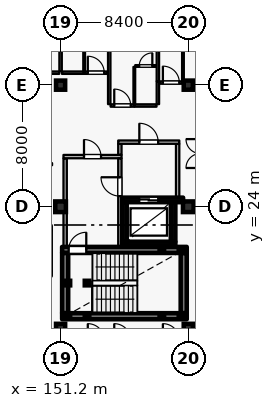
"""IFC4 building model, lengths in metres.
Left out: names, types, materials, properties, quantities, classifications, styles, units other than length and angle.
Written with IfcOpenShell. Run it as: python <this file> out.ifc"""

import sys

from ifc_helpers import new_model, si_unit, direction, frame, frame_2d, origin, origin_2d, place, context, subcontext, project, spatial, rectangle, hollow_rectangle, extrude, element, fill, save


model = new_model("IFC4")
c1 = context("Model", 3, precision=1e-05, world=origin(), true_north=direction((0.0, 1.0)))
c2 = subcontext(c1, "Body", "Model", "MODEL_VIEW")
j1 = project(units=[si_unit("LENGTHUNIT", "METRE"), si_unit("PLANEANGLEUNIT", "RADIAN")], contexts=[c1])
p1 = place(None, origin())
s1 = spatial("IfcSite", under=j1, at=p1, CompositionType="ELEMENT")
p2 = place(p1, origin())
s2 = spatial("IfcBuilding", under=s1, at=p2, CompositionType="ELEMENT")
p3 = place(p2, frame((0.0, 0.0, 36.0)))
s3 = spatial("IfcBuildingStorey", under=s2, at=p3, CompositionType="ELEMENT", Elevation=36.0)
for number, where, z_axis, x_axis in (
    (1, (151.2, 24.0, 0.0), (0.0, 0.0, 1.0), (1.0, 0.0, 0.0)),
    (2, (159.6, 24.0, 0.0), (0.0, 0.0, 1.0), (1.0, 0.0, 0.0)),
):
    element("IfcColumn", number, at=place(p3, frame(where, z_axis=z_axis, x_axis=x_axis)), inside=s3, PredefinedType="COLUMN", context=c2, shape_type="SweptSolid", body=[
        extrude(rectangle(XDim=0.7, YDim=0.7, at=origin_2d()), origin(), (0.0, 0.0, 1.0), 3.6),
    ])
for number, where, z_axis, x_axis in (
    (3, (151.2, 16.0, 0.0), (0.0, 0.0, 1.0), (1.0, 0.0, 0.0)),
    (4, (151.2, 32.0, 0.0), (0.0, 0.0, 1.0), (1.0, 0.0, 0.0)),
    (5, (159.6, 16.0, 0.0), (0.0, 0.0, 1.0), (1.0, 0.0, 0.0)),
    (6, (159.6, 32.0, 0.0), (0.0, 0.0, 1.0), (1.0, 0.0, 0.0)),
):
    element("IfcColumn", number, at=place(p3, frame(where, z_axis=z_axis, x_axis=x_axis)), inside=s3, PredefinedType="COLUMN", context=c2, shape_type="SweptSolid", body=[
        extrude(rectangle(XDim=0.6, YDim=0.6, at=origin_2d()), origin(), (0.0, 0.0, 1.0), 3.6),
    ])
p4 = place(p3, frame((143.15, 32.333, 0.0), z_axis=(0.0, 0.0, 1.0), x_axis=(0.724116091282, 0.689678103427, 0.0)))
e7 = element("IfcWall", 7, at=p4, inside=s3, PredefinedType="SOLIDWALL", context=c2, shape_type="SweptSolid", body=[
    extrude(rectangle(XDim=10.634, YDim=0.24, at=frame_2d((5.317, 0.0))), origin(), (0.0, 0.0, 1.0), 2.94),
])
p5 = place(p4, frame((0.16, 0.0, 0.8)))
e8 = element("IfcOpeningElement", 8, at=p5, cuts=e7, PredefinedType="OPENING", context=c2, shape_type="SweptSolid", body=[
    extrude(rectangle(XDim=1.6, YDim=1.6, at=frame_2d((0.8, 0.8))), frame((0.0, 0.13, 0.0), z_axis=(0.0, -1.0, 0.0), x_axis=(1.0, 0.0, 0.0)), (0.0, 0.0, 1.0), 0.26),
])
p6 = place(p4, frame((3.523, 0.0, 0.8)))
e9 = element("IfcOpeningElement", 9, at=p6, cuts=e7, PredefinedType="OPENING", context=c2, shape_type="SweptSolid", body=[
    extrude(rectangle(XDim=1.6, YDim=1.6, at=frame_2d((0.8, 0.8))), frame((0.0, 0.13, 0.0), z_axis=(0.0, -1.0, 0.0), x_axis=(1.0, 0.0, 0.0)), (0.0, 0.0, 1.0), 0.26),
])
p7 = place(p4, frame((7.88, 0.0, 0.8)))
e10 = element("IfcOpeningElement", 10, at=p7, cuts=e7, PredefinedType="OPENING", context=c2, shape_type="SweptSolid", body=[
    extrude(rectangle(XDim=1.6, YDim=1.6, at=frame_2d((0.8, 0.8))), frame((0.0, 0.13, 0.0), z_axis=(0.0, -1.0, 0.0), x_axis=(1.0, 0.0, 0.0)), (0.0, 0.0, 1.0), 0.26),
])
p8 = place(p3, frame((155.25, 21.55, 0.0), z_axis=(0.0, 0.0, 1.0), x_axis=(1.0, 0.0, 0.0)))
e11 = element("IfcWall", 11, at=p8, inside=s3, PredefinedType="SHEAR", context=c2, shape_type="SweptSolid", body=[
    extrude(rectangle(XDim=3.5, YDim=0.3, at=frame_2d((1.75, 0.0))), origin(), (0.0, 0.0, 1.0), 3.365),
])
p9 = place(p3, frame((158.6, 21.705, 0.0), z_axis=(0.0, 0.0, 1.0), x_axis=(0.0, 1.0, 0.0)))
e12 = element("IfcWall", 12, at=p9, inside=s3, PredefinedType="SHEAR", context=c2, shape_type="SweptSolid", body=[
    extrude(rectangle(XDim=2.59, YDim=0.3, at=frame_2d((1.295, 0.0))), origin(), (0.0, 0.0, 1.0), 3.365),
])
p10 = place(p3, frame((159.26, 24.45, 0.0), z_axis=(0.0, 0.0, 1.0), x_axis=(-1.0, 0.0, 0.0)))
e13 = element("IfcWall", 13, at=p10, inside=s3, PredefinedType="SHEAR", context=c2, shape_type="SweptSolid", body=[
    extrude(rectangle(XDim=4.01, YDim=0.3, at=frame_2d((2.005, 0.0))), origin(), (0.0, 0.0, 1.0), 3.365),
])
p11 = place(p10, frame((1.635, 0.0, 0.0)))
e14 = element("IfcOpeningElement", 14, at=p11, cuts=e13, PredefinedType="OPENING", context=c2, shape_type="SweptSolid", body=[
    extrude(rectangle(XDim=1.25, YDim=2.25, at=frame_2d((0.625, 1.125))), frame((0.0, 0.16, 0.0), z_axis=(0.0, -1.0, 0.0), x_axis=(1.0, 0.0, 0.0)), (0.0, 0.0, 1.0), 0.32),
])
p12 = place(p3, frame((155.4, 24.295, 0.0), z_axis=(0.0, 0.0, 1.0), x_axis=(0.0, -1.0, 0.0)))
e15 = element("IfcWall", 15, at=p12, inside=s3, PredefinedType="SHEAR", context=c2, shape_type="SweptSolid", body=[
    extrude(rectangle(XDim=2.59, YDim=0.3, at=frame_2d((1.295, 0.0))), origin(), (0.0, 0.0, 1.0), 3.365),
])
p13 = place(p3, frame((151.3, 16.8, 0.0), z_axis=(0.0, 0.0, 1.0), x_axis=(1.0, 0.0, 0.0)))
e16 = element("IfcWall", 16, at=p13, inside=s3, PredefinedType="SHEAR", context=c2, shape_type="SweptSolid", body=[
    extrude(rectangle(XDim=8.2, YDim=0.4, at=frame_2d((4.1, 0.0))), origin(), (0.0, 0.0, 1.0), 3.365),
])
p14 = place(p3, frame((159.3, 17.005, 0.0), z_axis=(0.0, 0.0, 1.0), x_axis=(0.0, 1.0, 0.0)))
e17 = element("IfcWall", 17, at=p14, inside=s3, PredefinedType="SHEAR", context=c2, shape_type="SweptSolid", body=[
    extrude(rectangle(XDim=3.95, YDim=0.4, at=frame_2d((1.975, 0.0))), origin(), (0.0, 0.0, 1.0), 3.365),
])
p15 = place(p3, frame((151.3, 21.16, 0.0), z_axis=(0.0, 0.0, 1.0), x_axis=(1.0, 0.0, 0.0)))
e18 = element("IfcWall", 18, at=p15, inside=s3, PredefinedType="SHEAR", context=c2, shape_type="SweptSolid", body=[
    extrude(rectangle(XDim=8.2, YDim=0.4, at=frame_2d((4.1, 0.0))), origin(), (0.0, 0.0, 1.0), 3.365),
])
p16 = place(p15, frame((0.43, 0.0, 0.0)))
e19 = element("IfcOpeningElement", 19, at=p16, cuts=e18, PredefinedType="OPENING", context=c2, shape_type="SweptSolid", body=[
    extrude(rectangle(XDim=1.16, YDim=2.2, at=frame_2d((0.58, 1.1))), frame((0.0, 0.21, 0.0), z_axis=(0.0, -1.0, 0.0), x_axis=(1.0, 0.0, 0.0)), (0.0, 0.0, 1.0), 0.42),
])
p17 = place(p3, frame((151.5, 17.005, 0.0), z_axis=(0.0, 0.0, 1.0), x_axis=(0.0, 1.0, 0.0)))
e20 = element("IfcWall", 20, at=p17, inside=s3, PredefinedType="SHEAR", context=c2, shape_type="SweptSolid", body=[
    extrude(rectangle(XDim=3.95, YDim=0.4, at=frame_2d((1.975, 0.0))), origin(), (0.0, 0.0, 1.0), 3.365),
])
p18 = place(p3, frame((151.5, 21.365, 0.0), z_axis=(0.0, 0.0, 1.0), x_axis=(0.0, 1.0, 0.0)))
e21 = element("IfcWall", 21, at=p18, inside=s3, PredefinedType="PARTITIONING", context=c2, shape_type="SweptSolid", body=[
    extrude(rectangle(XDim=5.82, YDim=0.22, at=frame_2d((2.91, 0.0))), origin(), (0.0, 0.0, 1.0), 3.365),
])
p19 = place(p3, frame((151.39, 27.3, 0.0), z_axis=(0.0, 0.0, 1.0), x_axis=(1.0, 0.0, 0.0)))
e22 = element("IfcWall", 22, at=p19, inside=s3, PredefinedType="PARTITIONING", context=c2, shape_type="SweptSolid", body=[
    extrude(rectangle(XDim=3.82, YDim=0.22, at=frame_2d((1.91, 0.0))), origin(), (0.0, 0.0, 1.0), 3.365),
])
p20 = place(p19, frame((1.35, 0.0, 0.0)))
e23 = element("IfcOpeningElement", 23, at=p20, cuts=e22, PredefinedType="OPENING", context=c2, shape_type="SweptSolid", body=[
    extrude(rectangle(XDim=1.12, YDim=2.2, at=frame_2d((0.56, 1.1))), frame((0.0, 0.12, 0.0), z_axis=(0.0, -1.0, 0.0), x_axis=(1.0, 0.0, 0.0)), (0.0, 0.0, 1.0), 0.24),
])
p21 = place(p3, frame((155.1, 21.365, 0.0), z_axis=(0.0, 0.0, 1.0), x_axis=(0.0, 1.0, 0.0)))
e24 = element("IfcWall", 24, at=p21, inside=s3, PredefinedType="PARTITIONING", context=c2, shape_type="SweptSolid", body=[
    extrude(rectangle(XDim=5.82, YDim=0.22, at=frame_2d((2.91, 0.0))), origin(), (0.0, 0.0, 1.0), 3.365),
])
p22 = place(p21, frame((3.335, 0.0, 0.0)))
e25 = element("IfcOpeningElement", 25, at=p22, cuts=e24, PredefinedType="OPENING", context=c2, shape_type="SweptSolid", body=[
    extrude(rectangle(XDim=1.24, YDim=2.2, at=frame_2d((0.62, 1.1))), frame((0.0, 0.12, 0.0), z_axis=(0.0, -1.0, 0.0), x_axis=(1.0, 0.0, 0.0)), (0.0, 0.0, 1.0), 0.24),
])
p23 = place(p3, frame((155.1, 27.415, 0.0), z_axis=(0.0, 0.0, 1.0), x_axis=(0.0, 1.0, 0.0)))
e26 = element("IfcWall", 26, at=p23, inside=s3, PredefinedType="PARTITIONING", context=c2, shape_type="SweptSolid", body=[
    extrude(rectangle(XDim=0.72, YDim=0.22, at=frame_2d((0.36, 0.0))), origin(), (0.0, 0.0, 1.0), 3.365),
])
p24 = place(p3, frame((158.9, 24.605, 0.0), z_axis=(0.0, 0.0, 1.0), x_axis=(0.0, 1.0, 0.0)))
e27 = element("IfcWall", 27, at=p24, inside=s3, PredefinedType="PARTITIONING", context=c2, shape_type="SweptSolid", body=[
    extrude(rectangle(XDim=3.53, YDim=0.22, at=frame_2d((1.765, 0.0))), origin(), (0.0, 0.0, 1.0), 3.365),
])
p25 = place(p3, frame((154.99, 28.25, 0.0), z_axis=(0.0, 0.0, 1.0), x_axis=(1.0, 0.0, 0.0)))
e28 = element("IfcWall", 28, at=p25, inside=s3, PredefinedType="PARTITIONING", context=c2, shape_type="SweptSolid", body=[
    extrude(rectangle(XDim=4.02, YDim=0.22, at=frame_2d((2.01, 0.0))), origin(), (0.0, 0.0, 1.0), 3.365),
])
p26 = place(p25, frame((1.39, 0.0, 0.0)))
e29 = element("IfcOpeningElement", 29, at=p26, cuts=e28, PredefinedType="OPENING", context=c2, shape_type="SweptSolid", body=[
    extrude(rectangle(XDim=1.24, YDim=2.2, at=frame_2d((0.62, 1.1))), frame((0.0, 0.12, 0.0), z_axis=(0.0, -1.0, 0.0), x_axis=(1.0, 0.0, 0.0)), (0.0, 0.0, 1.0), 0.24),
])
for number, where, z_axis, x_axis in (
    (30, (151.68, 16.8, 0.0), (0.0, 0.0, 1.0), (1.0, 0.0, 0.0)),
    (31, (151.68, 18.98, 0.0), (0.0, 0.0, 1.0), (1.0, 0.0, 0.0)),
    (32, (152.94, 16.8, 0.0), (0.0, 0.0, 1.0), (1.0, 0.0, 0.0)),
    (33, (152.94, 18.98, 0.0), (0.0, 0.0, 1.0), (1.0, 0.0, 0.0)),
):
    element("IfcColumn", number, at=place(p3, frame(where, z_axis=z_axis, x_axis=x_axis)), inside=s3, PredefinedType="COLUMN", context=c2, shape_type="SweptSolid", body=[
        extrude(hollow_rectangle(XDim=0.3, YDim=0.3, WallThickness=0.012, at=origin_2d()), origin(), (0.0, 0.0, 1.0), 3.42),
    ])
for number, where, z_axis, x_axis in (
    (34, (157.86, 16.8, -1.8), (0.0, 0.0, 1.0), (1.0, 0.0, 0.0)),
    (35, (157.86, 21.16, -1.8), (0.0, 0.0, 1.0), (1.0, 0.0, 0.0)),
    (36, (159.12, 16.8, -1.8), (0.0, 0.0, 1.0), (1.0, 0.0, 0.0)),
    (37, (159.12, 21.16, -1.8), (0.0, 0.0, 1.0), (1.0, 0.0, 0.0)),
):
    element("IfcColumn", number, at=place(p3, frame(where, z_axis=z_axis, x_axis=x_axis)), inside=s3, PredefinedType="COLUMN", context=c2, shape_type="SweptSolid", body=[
        extrude(hollow_rectangle(XDim=0.3, YDim=0.3, WallThickness=0.012, at=origin_2d()), origin(), (0.0, 0.0, 1.0), 3.42),
    ])
p27 = place(p3, frame((149.64, 32.82, 0.0), z_axis=(0.0, 0.0, 1.0), x_axis=(1.0, 0.0, 0.0)))
e38 = element("IfcWall", 38, at=p27, inside=s3, PredefinedType="PARTITIONING", context=c2, shape_type="SweptSolid", body=[
    extrude(rectangle(XDim=1.47, YDim=0.16, at=frame_2d((0.735, 0.0))), origin(), (0.0, 0.0, 1.0), 3.365),
])
p28 = place(p3, frame((151.29, 32.82, 0.0), z_axis=(0.0, 0.0, 1.0), x_axis=(1.0, 0.0, 0.0)))
e39 = element("IfcWall", 39, at=p28, inside=s3, PredefinedType="PARTITIONING", context=c2, shape_type="SweptSolid", body=[
    extrude(rectangle(XDim=1.45, YDim=0.16, at=frame_2d((0.725, 0.0))), origin(), (0.0, 0.0, 1.0), 3.365),
])
p29 = place(p3, frame((152.75, 32.82, 0.0), z_axis=(0.0, 0.0, 1.0), x_axis=(1.0, 0.0, 0.0)))
e40 = element("IfcWall", 40, at=p29, inside=s3, PredefinedType="PARTITIONING", context=c2, shape_type="SweptSolid", body=[
    extrude(rectangle(XDim=1.56, YDim=0.16, at=frame_2d((0.78, 0.0))), origin(), (0.0, 0.0, 1.0), 3.365),
])
p30 = place(p29, frame((0.24, 0.0, 0.0)))
e41 = element("IfcOpeningElement", 41, at=p30, cuts=e40, PredefinedType="OPENING", context=c2, shape_type="SweptSolid", body=[
    extrude(rectangle(XDim=1.08, YDim=2.3, at=frame_2d((0.54, 1.15))), frame((0.0, 0.09, 0.0), z_axis=(0.0, -1.0, 0.0), x_axis=(1.0, 0.0, 0.0)), (0.0, 0.0, 1.0), 0.18),
])
p31 = place(p3, frame((152.75, 32.91, 0.0), z_axis=(0.0, 0.0, 1.0), x_axis=(0.0, 1.0, 0.0)))
e42 = element("IfcWall", 42, at=p31, inside=s3, PredefinedType="PARTITIONING", context=c2, shape_type="SweptSolid", body=[
    extrude(rectangle(XDim=2.45, YDim=0.115, at=frame_2d((1.225, 0.0))), origin(), (0.0, 0.0, 1.0), 3.365),
])
p32 = place(p3, frame((151.2, 32.91, 0.0), z_axis=(0.0, 0.0, 1.0), x_axis=(0.0, 1.0, 0.0)))
e43 = element("IfcWall", 43, at=p32, inside=s3, PredefinedType="PARTITIONING", context=c2, shape_type="SweptSolid", body=[
    extrude(rectangle(XDim=6.75, YDim=0.16, at=frame_2d((3.375, 0.0))), origin(), (0.0, 0.0, 1.0), 2.74),
])
p33 = place(p3, frame((154.49, 30.66, 0.0), z_axis=(0.0, 0.0, 1.0), x_axis=(1.0, 0.0, 0.0)))
e44 = element("IfcWall", 44, at=p33, inside=s3, PredefinedType="PARTITIONING", context=c2, shape_type="SweptSolid", body=[
    extrude(rectangle(XDim=1.56, YDim=0.16, at=frame_2d((0.78, 0.0))), origin(), (0.0, 0.0, 1.0), 3.365),
])
p34 = place(p33, frame((0.24, 0.0, 0.0)))
e45 = element("IfcOpeningElement", 45, at=p34, cuts=e44, PredefinedType="OPENING", context=c2, shape_type="SweptSolid", body=[
    extrude(rectangle(XDim=1.08, YDim=2.3, at=frame_2d((0.54, 1.15))), frame((0.0, 0.09, 0.0), z_axis=(0.0, -1.0, 0.0), x_axis=(1.0, 0.0, 0.0)), (0.0, 0.0, 1.0), 0.18),
])
p35 = place(p3, frame((156.06, 30.66, 0.0), z_axis=(0.0, 0.0, 1.0), x_axis=(1.0, 0.0, 0.0)))
e46 = element("IfcWall", 46, at=p35, inside=s3, PredefinedType="PARTITIONING", context=c2, shape_type="SweptSolid", body=[
    extrude(rectangle(XDim=1.45, YDim=0.16, at=frame_2d((0.725, 0.0))), origin(), (0.0, 0.0, 1.0), 3.365),
])
p36 = place(p3, frame((156.05, 30.75, 0.0), z_axis=(0.0, 0.0, 1.0), x_axis=(0.0, 1.0, 0.0)))
e47 = element("IfcWall", 47, at=p36, inside=s3, PredefinedType="PARTITIONING", context=c2, shape_type="SweptSolid", body=[
    extrude(rectangle(XDim=2.45, YDim=0.115, at=frame_2d((1.225, 0.0))), origin(), (0.0, 0.0, 1.0), 3.365),
])
p37 = place(p3, frame((156.11, 33.26, 0.0), z_axis=(0.0, 0.0, 1.0), x_axis=(1.0, 0.0, 0.0)))
e48 = element("IfcWall", 48, at=p37, inside=s3, PredefinedType="PARTITIONING", context=c2, shape_type="SweptSolid", body=[
    extrude(rectangle(XDim=1.39, YDim=0.115, at=frame_2d((0.695, 0.0))), origin(), (0.0, 0.0, 1.0), 3.365),
])
p38 = place(p37, frame((0.265, 0.0, 0.0)))
e49 = element("IfcOpeningElement", 49, at=p38, cuts=e48, PredefinedType="OPENING", context=c2, shape_type="SweptSolid", body=[
    extrude(rectangle(XDim=0.86, YDim=2.12, at=frame_2d((0.43, 1.06))), frame((0.0, 0.067, 0.0), z_axis=(0.0, -1.0, 0.0), x_axis=(1.0, 0.0, 0.0)), (0.0, 0.0, 1.0), 0.135),
])
p39 = place(p3, frame((154.4, 30.75, 0.0), z_axis=(0.0, 0.0, 1.0), x_axis=(0.0, 1.0, 0.0)))
e50 = element("IfcWall", 50, at=p39, inside=s3, PredefinedType="PARTITIONING", context=c2, shape_type="SweptSolid", body=[
    extrude(rectangle(XDim=8.91, YDim=0.16, at=frame_2d((4.455, 0.0))), origin(), (0.0, 0.0, 1.0), 3.365),
])
p40 = place(p3, frame((157.6, 30.75, 0.0), z_axis=(0.0, 0.0, 1.0), x_axis=(0.0, 1.0, 0.0)))
e51 = element("IfcWall", 51, at=p40, inside=s3, PredefinedType="PARTITIONING", context=c2, shape_type="SweptSolid", body=[
    extrude(rectangle(XDim=1.5, YDim=0.16, at=frame_2d((0.75, 0.0))), origin(), (0.0, 0.0, 1.0), 3.365),
])
p41 = place(p3, frame((157.69, 32.17, 0.0), z_axis=(0.0, 0.0, 1.0), x_axis=(1.0, 0.0, 0.0)))
e52 = element("IfcWall", 52, at=p41, inside=s3, PredefinedType="PARTITIONING", context=c2, shape_type="SweptSolid", body=[
    extrude(rectangle(XDim=1.56, YDim=0.16, at=frame_2d((0.78, 0.0))), origin(), (0.0, 0.0, 1.0), 2.84),
])
p42 = place(p41, frame((0.24, 0.0, 0.0)))
e53 = element("IfcOpeningElement", 53, at=p42, cuts=e52, PredefinedType="OPENING", context=c2, shape_type="SweptSolid", body=[
    extrude(rectangle(XDim=1.08, YDim=2.3, at=frame_2d((0.54, 1.15))), frame((0.0, 0.09, 0.0), z_axis=(0.0, -1.0, 0.0), x_axis=(1.0, 0.0, 0.0)), (0.0, 0.0, 1.0), 0.18),
])
p43 = place(p3, frame((159.26, 32.17, 0.0), z_axis=(0.0, 0.0, 1.0), x_axis=(1.0, 0.0, 0.0)))
e54 = element("IfcWall", 54, at=p43, inside=s3, PredefinedType="PARTITIONING", context=c2, shape_type="SweptSolid", body=[
    extrude(rectangle(XDim=1.45, YDim=0.16, at=frame_2d((0.725, 0.0))), origin(), (0.0, 0.0, 1.0), 3.365),
])
p44 = place(p3, frame((159.25, 32.26, 0.0), z_axis=(0.0, 0.0, 1.0), x_axis=(0.0, 1.0, 0.0)))
e55 = element("IfcWall", 55, at=p44, inside=s3, PredefinedType="PARTITIONING", context=c2, shape_type="SweptSolid", body=[
    extrude(rectangle(XDim=2.45, YDim=0.115, at=frame_2d((1.225, 0.0))), origin(), (0.0, 0.0, 1.0), 3.365),
])
p45 = place(p3, frame((157.6, 32.26, 0.0), z_axis=(0.0, 0.0, 1.0), x_axis=(0.0, 1.0, 0.0)))
e56 = element("IfcWall", 56, at=p45, inside=s3, PredefinedType="PARTITIONING", context=c2, shape_type="SweptSolid", body=[
    extrude(rectangle(XDim=7.4, YDim=0.16, at=frame_2d((3.7, 0.0))), origin(), (0.0, 0.0, 1.0), 3.365),
])
p46 = place(p11, origin())
e57 = element("IfcDoor", 57, at=p46, inside=s3, OperationType="DOUBLE_DOOR_SLIDING", PredefinedType="DOOR", context=c2, shape_type="SweptSolid", body=[
    extrude(rectangle(XDim=1.25, YDim=2.25, at=frame_2d((0.625, 1.125))), frame((0.0, 0.025, 0.0), z_axis=(0.0, -1.0, 0.0), x_axis=(1.0, 0.0, 0.0)), (0.0, 0.0, 1.0), 0.05),
])
fill(e14, e57)
p47 = place(p16, origin())
e58 = element("IfcDoor", 58, at=p47, inside=s3, OperationType="SINGLE_SWING_RIGHT", PredefinedType="DOOR", context=c2, shape_type="SweptSolid", body=[
    extrude(rectangle(XDim=1.16, YDim=2.2, at=frame_2d((0.58, 1.1))), frame((0.0, 0.025, 0.0), z_axis=(0.0, -1.0, 0.0), x_axis=(1.0, 0.0, 0.0)), (0.0, 0.0, 1.0), 0.05),
])
fill(e19, e58)
p48 = place(p20, origin())
e59 = element("IfcDoor", 59, at=p48, inside=s3, OperationType="SINGLE_SWING_LEFT", PredefinedType="DOOR", context=c2, shape_type="SweptSolid", body=[
    extrude(rectangle(XDim=1.12, YDim=2.2, at=frame_2d((0.56, 1.1))), frame((0.0, 0.025, 0.0), z_axis=(0.0, -1.0, 0.0), x_axis=(1.0, 0.0, 0.0)), (0.0, 0.0, 1.0), 0.05),
])
fill(e23, e59)
p49 = place(p22, origin())
e60 = element("IfcDoor", 60, at=p49, inside=s3, OperationType="SINGLE_SWING_RIGHT", PredefinedType="DOOR", context=c2, shape_type="SweptSolid", body=[
    extrude(rectangle(XDim=1.24, YDim=2.2, at=frame_2d((0.62, 1.1))), frame((0.0, 0.025, 0.0), z_axis=(0.0, -1.0, 0.0), x_axis=(1.0, 0.0, 0.0)), (0.0, 0.0, 1.0), 0.05),
])
fill(e25, e60)
p50 = place(p26, origin())
e61 = element("IfcDoor", 61, at=p50, inside=s3, OperationType="SINGLE_SWING_LEFT", PredefinedType="DOOR", context=c2, shape_type="SweptSolid", body=[
    extrude(rectangle(XDim=1.24, YDim=2.2, at=frame_2d((0.62, 1.1))), frame((0.0, 0.025, 0.0), z_axis=(0.0, -1.0, 0.0), x_axis=(1.0, 0.0, 0.0)), (0.0, 0.0, 1.0), 0.05),
])
fill(e29, e61)
p51 = place(p30, origin())
e62 = element("IfcDoor", 62, at=p51, inside=s3, OperationType="SINGLE_SWING_LEFT", PredefinedType="DOOR", context=c2, shape_type="SweptSolid", body=[
    extrude(rectangle(XDim=1.08, YDim=2.3, at=frame_2d((0.54, 1.15))), frame((0.0, 0.025, 0.0), z_axis=(0.0, -1.0, 0.0), x_axis=(1.0, 0.0, 0.0)), (0.0, 0.0, 1.0), 0.05),
])
fill(e41, e62)
p52 = place(p34, origin())
e63 = element("IfcDoor", 63, at=p52, inside=s3, OperationType="SINGLE_SWING_LEFT", PredefinedType="DOOR", context=c2, shape_type="SweptSolid", body=[
    extrude(rectangle(XDim=1.08, YDim=2.3, at=frame_2d((0.54, 1.15))), frame((0.0, 0.025, 0.0), z_axis=(0.0, -1.0, 0.0), x_axis=(1.0, 0.0, 0.0)), (0.0, 0.0, 1.0), 0.05),
])
fill(e45, e63)
p53 = place(p38, origin())
e64 = element("IfcDoor", 64, at=p53, inside=s3, OperationType="SINGLE_SWING_RIGHT", PredefinedType="DOOR", context=c2, shape_type="SweptSolid", body=[
    extrude(rectangle(XDim=0.86, YDim=2.12, at=frame_2d((0.43, 1.06))), frame((0.0, 0.025, 0.0), z_axis=(0.0, -1.0, 0.0), x_axis=(1.0, 0.0, 0.0)), (0.0, 0.0, 1.0), 0.05),
])
fill(e49, e64)
p54 = place(p42, origin())
e65 = element("IfcDoor", 65, at=p54, inside=s3, OperationType="SINGLE_SWING_LEFT", PredefinedType="DOOR", context=c2, shape_type="SweptSolid", body=[
    extrude(rectangle(XDim=1.08, YDim=2.3, at=frame_2d((0.54, 1.15))), frame((0.0, 0.025, 0.0), z_axis=(0.0, -1.0, 0.0), x_axis=(1.0, 0.0, 0.0)), (0.0, 0.0, 1.0), 0.05),
])
fill(e53, e65)
save(model, sys.argv[1])
